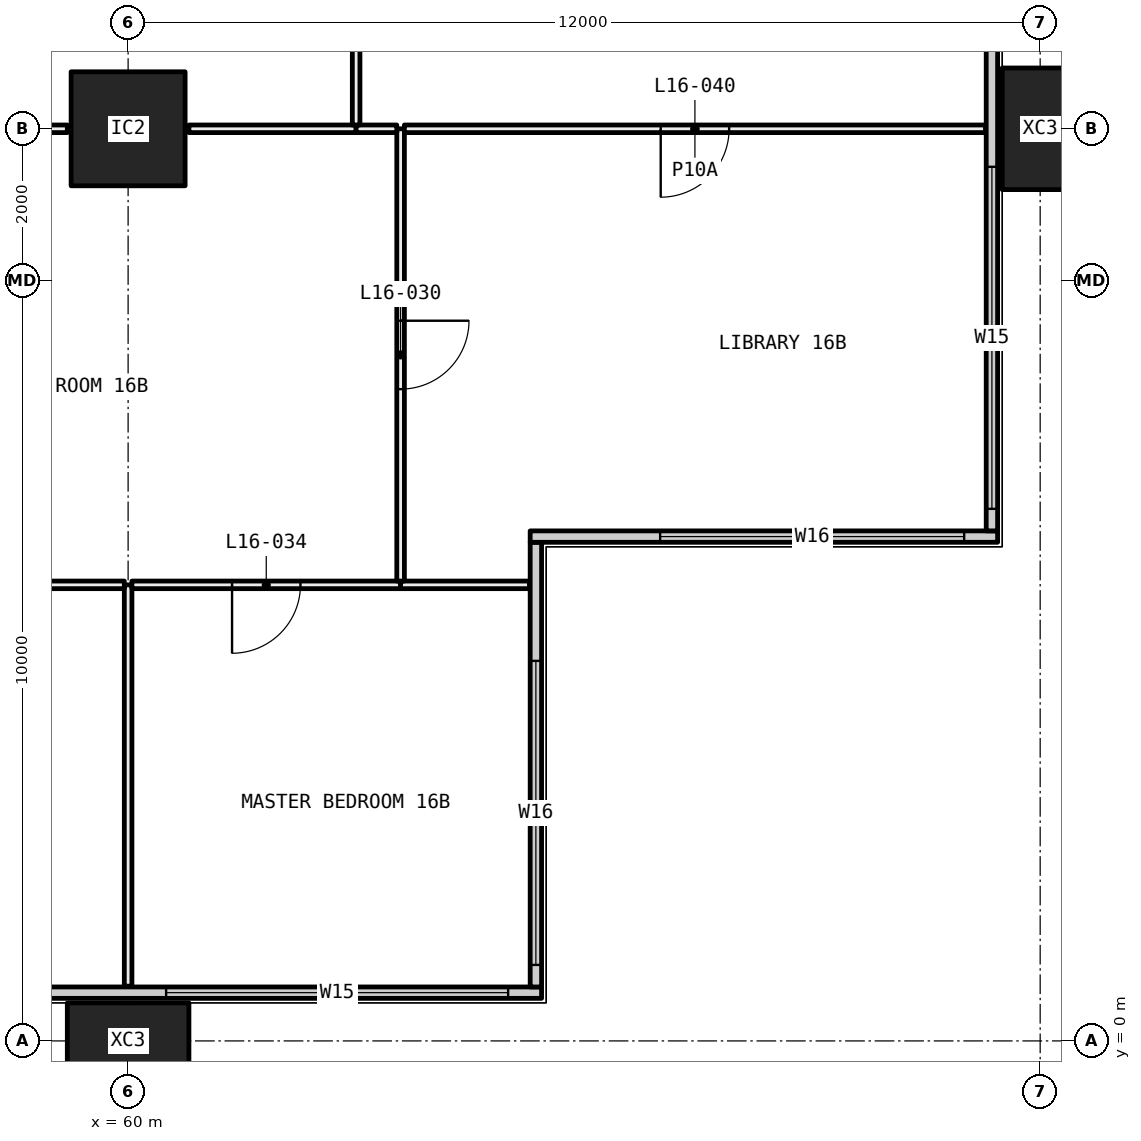
"""IFC4 building model, lengths in metres.
Left out: names, types, materials, properties, quantities, classifications, styles, units other than length and angle.
Written with IfcOpenShell. Run it as: python <this file> out.ifc"""

import sys

from ifc_helpers import new_model, si_unit, direction, frame, frame_2d, origin, origin_2d, place, context, subcontext, project, spatial, rectangle, hollow_rectangle, extrude, element, fill, save


model = new_model("IFC4")
c1 = context("Model", 3, precision=1e-05, world=origin(), true_north=direction((0.0, 1.0)))
c2 = subcontext(c1, "Body", "Model", "MODEL_VIEW")
j1 = project(units=[si_unit("LENGTHUNIT", "METRE"), si_unit("PLANEANGLEUNIT", "RADIAN")], contexts=[c1])
p1 = place(None, origin())
s1 = spatial("IfcSite", under=j1, at=p1, CompositionType="ELEMENT")
p2 = place(p1, origin())
s2 = spatial("IfcBuilding", under=s1, at=p2, CompositionType="ELEMENT")
p3 = place(p2, frame((0.0, 0.0, 67.95)))
s3 = spatial("IfcBuildingStorey", under=s2, at=p3, CompositionType="ELEMENT", Elevation=67.95)
p4 = place(p3, frame((60.0, 0.0, -0.4), z_axis=(0.0, 0.0, 1.0), x_axis=(1.0, 0.0, 0.0)))
e1 = element("IfcColumn", 1, at=p4, inside=s3, PredefinedType="COLUMN", context=c2, shape_type="SweptSolid", body=[
    extrude(hollow_rectangle(XDim=1.6, YDim=1.0, WallThickness=0.065, at=origin_2d()), origin(), (0.0, 0.0, 1.0), 3.45),
])
p5 = place(p3, frame((60.0, 12.0, 0.0), z_axis=(0.0, 0.0, 1.0), x_axis=(1.0, 0.0, 0.0)))
e2 = element("IfcColumn", 2, at=p5, inside=s3, PredefinedType="COLUMN", context=c2, shape_type="SweptSolid", body=[
    extrude(hollow_rectangle(XDim=1.5, YDim=1.5, WallThickness=0.065, at=origin_2d()), origin(), (0.0, 0.0, 1.0), 3.05),
])
p6 = place(p3, frame((72.0, 12.0, -0.4), z_axis=(0.0, 0.0, 1.0), x_axis=(0.0, 1.0, 0.0)))
e3 = element("IfcColumn", 3, at=p6, inside=s3, PredefinedType="COLUMN", context=c2, shape_type="SweptSolid", body=[
    extrude(hollow_rectangle(XDim=1.6, YDim=1.0, WallThickness=0.065, at=origin_2d()), origin(), (0.0, 0.0, 1.0), 3.45),
])
p7 = place(p3, frame((6.56, 0.635, 0.0), z_axis=(0.0, 0.0, 1.0), x_axis=(1.0, 0.0, 0.0)))
e4 = element("IfcWall", 4, at=p7, inside=s3, PredefinedType="ELEMENTEDWALL", context=c2, shape_type="SweptSolid", body=[
    extrude(rectangle(XDim=58.88, YDim=0.15, at=frame_2d((29.44, 0.0))), origin(), (0.0, 0.0, 1.0), 3.05),
])
p8 = place(p7, frame((0.44, 0.0, 0.45)))
e5 = element("IfcOpeningElement", 5, at=p8, cuts=e4, PredefinedType="OPENING", context=c2, shape_type="SweptSolid", body=[
    extrude(rectangle(XDim=4.5, YDim=2.55, at=frame_2d((2.25, 1.275))), frame((0.0, 0.085, 0.0), z_axis=(0.0, -1.0, 0.0), x_axis=(1.0, 0.0, 0.0)), (0.0, 0.0, 1.0), 0.17),
])
p9 = place(p7, frame((7.69, 0.0, 0.45)))
e6 = element("IfcOpeningElement", 6, at=p9, cuts=e4, PredefinedType="OPENING", context=c2, shape_type="SweptSolid", body=[
    extrude(rectangle(XDim=3.25, YDim=2.55, at=frame_2d((1.625, 1.275))), frame((0.0, 0.085, 0.0), z_axis=(0.0, -1.0, 0.0), x_axis=(1.0, 0.0, 0.0)), (0.0, 0.0, 1.0), 0.17),
])
p10 = place(p7, frame((11.94, 0.0, 0.45)))
e7 = element("IfcOpeningElement", 7, at=p10, cuts=e4, PredefinedType="OPENING", context=c2, shape_type="SweptSolid", body=[
    extrude(rectangle(XDim=3.25, YDim=2.55, at=frame_2d((1.625, 1.275))), frame((0.0, 0.085, 0.0), z_axis=(0.0, -1.0, 0.0), x_axis=(1.0, 0.0, 0.0)), (0.0, 0.0, 1.0), 0.17),
])
p11 = place(p7, frame((19.69, 0.0, 0.45)))
e8 = element("IfcOpeningElement", 8, at=p11, cuts=e4, PredefinedType="OPENING", context=c2, shape_type="SweptSolid", body=[
    extrude(rectangle(XDim=3.25, YDim=2.55, at=frame_2d((1.625, 1.275))), frame((0.0, 0.085, 0.0), z_axis=(0.0, -1.0, 0.0), x_axis=(1.0, 0.0, 0.0)), (0.0, 0.0, 1.0), 0.17),
])
p12 = place(p7, frame((23.94, 0.0, 0.45)))
e9 = element("IfcOpeningElement", 9, at=p12, cuts=e4, PredefinedType="OPENING", context=c2, shape_type="SweptSolid", body=[
    extrude(rectangle(XDim=2.0, YDim=2.55, at=frame_2d((1.0, 1.275))), frame((0.0, 0.085, 0.0), z_axis=(0.0, -1.0, 0.0), x_axis=(1.0, 0.0, 0.0)), (0.0, 0.0, 1.0), 0.17),
])
p13 = place(p7, frame((31.69, 0.0, 0.45)))
e10 = element("IfcOpeningElement", 10, at=p13, cuts=e4, PredefinedType="OPENING", context=c2, shape_type="SweptSolid", body=[
    extrude(rectangle(XDim=3.25, YDim=2.55, at=frame_2d((1.625, 1.275))), frame((0.0, 0.085, 0.0), z_axis=(0.0, -1.0, 0.0), x_axis=(1.0, 0.0, 0.0)), (0.0, 0.0, 1.0), 0.17),
])
p14 = place(p7, frame((35.94, 0.0, 0.45)))
e11 = element("IfcOpeningElement", 11, at=p14, cuts=e4, PredefinedType="OPENING", context=c2, shape_type="SweptSolid", body=[
    extrude(rectangle(XDim=3.25, YDim=2.55, at=frame_2d((1.625, 1.275))), frame((0.0, 0.085, 0.0), z_axis=(0.0, -1.0, 0.0), x_axis=(1.0, 0.0, 0.0)), (0.0, 0.0, 1.0), 0.17),
])
p15 = place(p7, frame((43.69, 0.0, 0.45)))
e12 = element("IfcOpeningElement", 12, at=p15, cuts=e4, PredefinedType="OPENING", context=c2, shape_type="SweptSolid", body=[
    extrude(rectangle(XDim=3.25, YDim=2.55, at=frame_2d((1.625, 1.275))), frame((0.0, 0.085, 0.0), z_axis=(0.0, -1.0, 0.0), x_axis=(1.0, 0.0, 0.0)), (0.0, 0.0, 1.0), 0.17),
])
p16 = place(p7, frame((47.94, 0.0, 0.45)))
e13 = element("IfcOpeningElement", 13, at=p16, cuts=e4, PredefinedType="OPENING", context=c2, shape_type="SweptSolid", body=[
    extrude(rectangle(XDim=2.0, YDim=2.55, at=frame_2d((1.0, 1.275))), frame((0.0, 0.085, 0.0), z_axis=(0.0, -1.0, 0.0), x_axis=(1.0, 0.0, 0.0)), (0.0, 0.0, 1.0), 0.17),
])
p17 = place(p7, frame((53.94, 0.0, 0.45)))
e14 = element("IfcOpeningElement", 14, at=p17, cuts=e4, PredefinedType="OPENING", context=c2, shape_type="SweptSolid", body=[
    extrude(rectangle(XDim=4.5, YDim=2.55, at=frame_2d((2.25, 1.275))), frame((0.0, 0.085, 0.0), z_axis=(0.0, -1.0, 0.0), x_axis=(1.0, 0.0, 0.0)), (0.0, 0.0, 1.0), 0.17),
])
p18 = place(p3, frame((65.365, 0.71, 0.0), z_axis=(0.0, 0.0, 1.0), x_axis=(0.0, 1.0, 0.0)))
e15 = element("IfcWall", 15, at=p18, inside=s3, PredefinedType="ELEMENTEDWALL", context=c2, shape_type="SweptSolid", body=[
    extrude(rectangle(XDim=5.85, YDim=0.15, at=frame_2d((2.925, 0.0))), origin(), (0.0, 0.0, 1.0), 3.05),
])
p19 = place(p18, frame((0.29, 0.0, 0.45)))
e16 = element("IfcOpeningElement", 16, at=p19, cuts=e15, PredefinedType="OPENING", context=c2, shape_type="SweptSolid", body=[
    extrude(rectangle(XDim=4.0, YDim=2.55, at=frame_2d((2.0, 1.275))), frame((0.0, 0.085, 0.0), z_axis=(0.0, -1.0, 0.0), x_axis=(1.0, 0.0, 0.0)), (0.0, 0.0, 1.0), 0.17),
])
p20 = place(p3, frame((65.29, 6.635, 0.0), z_axis=(0.0, 0.0, 1.0), x_axis=(1.0, 0.0, 0.0)))
e17 = element("IfcWall", 17, at=p20, inside=s3, PredefinedType="ELEMENTEDWALL", context=c2, shape_type="SweptSolid", body=[
    extrude(rectangle(XDim=6.15, YDim=0.15, at=frame_2d((3.075, 0.0))), origin(), (0.0, 0.0, 1.0), 3.05),
])
p21 = place(p20, frame((1.71, 0.0, 0.45)))
e18 = element("IfcOpeningElement", 18, at=p21, cuts=e17, PredefinedType="OPENING", context=c2, shape_type="SweptSolid", body=[
    extrude(rectangle(XDim=4.0, YDim=2.55, at=frame_2d((2.0, 1.275))), frame((0.0, 0.085, 0.0), z_axis=(0.0, -1.0, 0.0), x_axis=(1.0, 0.0, 0.0)), (0.0, 0.0, 1.0), 0.17),
])
p22 = place(p3, frame((71.365, 6.71, 0.0), z_axis=(0.0, 0.0, 1.0), x_axis=(0.0, 1.0, 0.0)))
e19 = element("IfcWall", 19, at=p22, inside=s3, PredefinedType="ELEMENTEDWALL", context=c2, shape_type="SweptSolid", body=[
    extrude(rectangle(XDim=34.58, YDim=0.15, at=frame_2d((17.29, 0.0))), origin(), (0.0, 0.0, 1.0), 3.05),
])
p23 = place(p22, frame((0.29, 0.0, 0.45)))
e20 = element("IfcOpeningElement", 20, at=p23, cuts=e19, PredefinedType="OPENING", context=c2, shape_type="SweptSolid", body=[
    extrude(rectangle(XDim=4.5, YDim=2.55, at=frame_2d((2.25, 1.275))), frame((0.0, 0.085, 0.0), z_axis=(0.0, -1.0, 0.0), x_axis=(1.0, 0.0, 0.0)), (0.0, 0.0, 1.0), 0.17),
])
p24 = place(p22, frame((7.54, 0.0, 0.45)))
e21 = element("IfcOpeningElement", 21, at=p24, cuts=e19, PredefinedType="OPENING", context=c2, shape_type="SweptSolid", body=[
    extrude(rectangle(XDim=3.25, YDim=2.55, at=frame_2d((1.625, 1.275))), frame((0.0, 0.085, 0.0), z_axis=(0.0, -1.0, 0.0), x_axis=(1.0, 0.0, 0.0)), (0.0, 0.0, 1.0), 0.17),
])
p25 = place(p22, frame((11.79, 0.0, 0.45)))
e22 = element("IfcOpeningElement", 22, at=p25, cuts=e19, PredefinedType="OPENING", context=c2, shape_type="SweptSolid", body=[
    extrude(rectangle(XDim=3.25, YDim=2.55, at=frame_2d((1.625, 1.275))), frame((0.0, 0.085, 0.0), z_axis=(0.0, -1.0, 0.0), x_axis=(1.0, 0.0, 0.0)), (0.0, 0.0, 1.0), 0.17),
])
p26 = place(p22, frame((19.54, 0.0, 0.45)))
e23 = element("IfcOpeningElement", 23, at=p26, cuts=e19, PredefinedType="OPENING", context=c2, shape_type="SweptSolid", body=[
    extrude(rectangle(XDim=3.25, YDim=2.55, at=frame_2d((1.625, 1.275))), frame((0.0, 0.085, 0.0), z_axis=(0.0, -1.0, 0.0), x_axis=(1.0, 0.0, 0.0)), (0.0, 0.0, 1.0), 0.17),
])
p27 = place(p22, frame((23.79, 0.0, 0.45)))
e24 = element("IfcOpeningElement", 24, at=p27, cuts=e19, PredefinedType="OPENING", context=c2, shape_type="SweptSolid", body=[
    extrude(rectangle(XDim=2.0, YDim=2.55, at=frame_2d((1.0, 1.275))), frame((0.0, 0.085, 0.0), z_axis=(0.0, -1.0, 0.0), x_axis=(1.0, 0.0, 0.0)), (0.0, 0.0, 1.0), 0.17),
])
p28 = place(p22, frame((29.79, 0.0, 0.45)))
e25 = element("IfcOpeningElement", 25, at=p28, cuts=e19, PredefinedType="OPENING", context=c2, shape_type="SweptSolid", body=[
    extrude(rectangle(XDim=4.5, YDim=2.55, at=frame_2d((2.25, 1.275))), frame((0.0, 0.085, 0.0), z_axis=(0.0, -1.0, 0.0), x_axis=(1.0, 0.0, 0.0)), (0.0, 0.0, 1.0), 0.17),
])
p29 = place(p3, frame((60.0, 0.72, 0.0), z_axis=(0.0, 0.0, 1.0), x_axis=(0.0, 1.0, 0.0)))
e26 = element("IfcWall", 26, at=p29, inside=s3, PredefinedType="PARTITIONING", context=c2, shape_type="SweptSolid", body=[
    extrude(rectangle(XDim=5.28, YDim=0.1, at=frame_2d((2.64, 0.0))), origin(), (0.0, 0.0, 1.0), 2.45),
])
p30 = place(p3, frame((59.95, 6.0, 0.0), z_axis=(0.0, 0.0, 1.0), x_axis=(-1.0, 0.0, 0.0)))
e27 = element("IfcWall", 27, at=p30, inside=s3, PredefinedType="PARTITIONING", context=c2, shape_type="SweptSolid", body=[
    extrude(rectangle(XDim=4.06, YDim=0.1, at=frame_2d((2.03, 0.0))), origin(), (0.0, 0.0, 1.0), 2.45),
])
p31 = place(p3, frame((63.585, 6.0, 0.0), z_axis=(0.0, 0.0, 1.0), x_axis=(-1.0, 0.0, 0.0)))
e28 = element("IfcWall", 28, at=p31, inside=s3, PredefinedType="PARTITIONING", context=c2, shape_type="SweptSolid", body=[
    extrude(rectangle(XDim=3.535, YDim=0.1, at=frame_2d((1.768, 0.0))), origin(), (0.0, 0.0, 1.0), 2.45),
])
p32 = place(p31, frame((1.317, 0.0, 0.0)))
e29 = element("IfcOpeningElement", 29, at=p32, cuts=e28, PredefinedType="OPENING", context=c2, shape_type="SweptSolid", body=[
    extrude(rectangle(XDim=0.9, YDim=2.1, at=frame_2d((0.45, 1.05))), frame((0.0, 0.06, 0.0), z_axis=(0.0, -1.0, 0.0), x_axis=(1.0, 0.0, 0.0)), (0.0, 0.0, 1.0), 0.12),
])
p33 = place(p3, frame((65.28, 6.0, 0.0), z_axis=(0.0, 0.0, 1.0), x_axis=(-1.0, 0.0, 0.0)))
e30 = element("IfcWall", 30, at=p33, inside=s3, PredefinedType="PARTITIONING", context=c2, shape_type="SweptSolid", body=[
    extrude(rectangle(XDim=1.695, YDim=0.1, at=frame_2d((0.848, 0.0))), origin(), (0.0, 0.0, 1.0), 3.05),
])
p34 = place(p3, frame((63.585, 6.05, 0.0), z_axis=(0.0, 0.0, 1.0), x_axis=(0.0, 1.0, 0.0)))
e31 = element("IfcWall", 31, at=p34, inside=s3, PredefinedType="PARTITIONING", context=c2, shape_type="SweptSolid", body=[
    extrude(rectangle(XDim=5.95, YDim=0.1, at=frame_2d((2.975, 0.0))), origin(), (0.0, 0.0, 1.0), 2.45),
])
p35 = place(p34, frame((2.525, 0.0, 0.0)))
e32 = element("IfcOpeningElement", 32, at=p35, cuts=e31, PredefinedType="OPENING", context=c2, shape_type="SweptSolid", body=[
    extrude(rectangle(XDim=0.9, YDim=2.1, at=frame_2d((0.45, 1.05))), frame((0.0, 0.06, 0.0), z_axis=(0.0, -1.0, 0.0), x_axis=(1.0, 0.0, 0.0)), (0.0, 0.0, 1.0), 0.12),
])
p36 = place(p3, frame((59.2, 12.0, 0.0), z_axis=(0.0, 0.0, 1.0), x_axis=(-1.0, 0.0, 0.0)))
e33 = element("IfcWall", 33, at=p36, inside=s3, PredefinedType="PARTITIONING", context=c2, shape_type="SweptSolid", body=[
    extrude(rectangle(XDim=3.26, YDim=0.1, at=frame_2d((1.63, 0.0))), origin(), (0.0, 0.0, 1.0), 2.45),
])
p37 = place(p3, frame((63.0, 12.0, 0.0), z_axis=(0.0, 0.0, 1.0), x_axis=(-1.0, 0.0, 0.0)))
e34 = element("IfcWall", 34, at=p37, inside=s3, PredefinedType="PARTITIONING", context=c2, shape_type="SweptSolid", body=[
    extrude(rectangle(XDim=2.2, YDim=0.1, at=frame_2d((1.1, 0.0))), origin(), (0.0, 0.0, 1.0), 2.45),
])
p38 = place(p3, frame((63.535, 12.0, 0.0), z_axis=(0.0, 0.0, 1.0), x_axis=(-1.0, 0.0, 0.0)))
e35 = element("IfcWall", 35, at=p38, inside=s3, PredefinedType="PARTITIONING", context=c2, shape_type="SweptSolid", body=[
    extrude(rectangle(XDim=0.535, YDim=0.1, at=frame_2d((0.268, 0.0))), origin(), (0.0, 0.0, 1.0), 2.45),
])
p39 = place(p3, frame((71.28, 12.0, 0.0), z_axis=(0.0, 0.0, 1.0), x_axis=(-1.0, 0.0, 0.0)))
e36 = element("IfcWall", 36, at=p39, inside=s3, PredefinedType="PARTITIONING", context=c2, shape_type="SweptSolid", body=[
    extrude(rectangle(XDim=7.645, YDim=0.1, at=frame_2d((3.823, 0.0))), origin(), (0.0, 0.0, 1.0), 2.45),
])
p40 = place(p39, frame((3.373, 0.0, 0.0)))
e37 = element("IfcOpeningElement", 37, at=p40, cuts=e36, PredefinedType="OPENING", context=c2, shape_type="SweptSolid", body=[
    extrude(rectangle(XDim=0.9, YDim=2.1, at=frame_2d((0.45, 1.05))), frame((0.0, 0.06, 0.0), z_axis=(0.0, -1.0, 0.0), x_axis=(1.0, 0.0, 0.0)), (0.0, 0.0, 1.0), 0.12),
])
p41 = place(p3, frame((63.0, 12.05, 0.0), z_axis=(0.0, 0.0, 1.0), x_axis=(0.0, 1.0, 0.0)))
e38 = element("IfcWall", 38, at=p41, inside=s3, PredefinedType="PARTITIONING", context=c2, shape_type="SweptSolid", body=[
    extrude(rectangle(XDim=5.85, YDim=0.1, at=frame_2d((2.925, 0.0))), origin(), (0.0, 0.0, 1.0), 2.45),
])
p42 = place(p17, origin())
e39 = element("IfcWindow", 39, at=p42, inside=s3, PartitioningType="SINGLE_PANEL", PredefinedType="WINDOW", context=c2, shape_type="SweptSolid", body=[
    extrude(rectangle(XDim=4.5, YDim=2.55, at=frame_2d((2.25, 1.275))), frame((0.0, 0.03, 0.0), z_axis=(0.0, -1.0, 0.0), x_axis=(1.0, 0.0, 0.0)), (0.0, 0.0, 1.0), 0.06),
])
fill(e14, e39)
p43 = place(p19, origin())
e40 = element("IfcWindow", 40, at=p43, inside=s3, PartitioningType="SINGLE_PANEL", PredefinedType="WINDOW", context=c2, shape_type="SweptSolid", body=[
    extrude(rectangle(XDim=4.0, YDim=2.55, at=frame_2d((2.0, 1.275))), frame((0.0, 0.03, 0.0), z_axis=(0.0, -1.0, 0.0), x_axis=(1.0, 0.0, 0.0)), (0.0, 0.0, 1.0), 0.06),
])
fill(e16, e40)
p44 = place(p21, origin())
e41 = element("IfcWindow", 41, at=p44, inside=s3, PartitioningType="SINGLE_PANEL", PredefinedType="WINDOW", context=c2, shape_type="SweptSolid", body=[
    extrude(rectangle(XDim=4.0, YDim=2.55, at=frame_2d((2.0, 1.275))), frame((0.0, 0.03, 0.0), z_axis=(0.0, -1.0, 0.0), x_axis=(1.0, 0.0, 0.0)), (0.0, 0.0, 1.0), 0.06),
])
fill(e18, e41)
p45 = place(p23, origin())
e42 = element("IfcWindow", 42, at=p45, inside=s3, PartitioningType="SINGLE_PANEL", PredefinedType="WINDOW", context=c2, shape_type="SweptSolid", body=[
    extrude(rectangle(XDim=4.5, YDim=2.55, at=frame_2d((2.25, 1.275))), frame((0.0, 0.03, 0.0), z_axis=(0.0, -1.0, 0.0), x_axis=(1.0, 0.0, 0.0)), (0.0, 0.0, 1.0), 0.06),
])
fill(e20, e42)
p46 = place(p35, frame((0.9, 0.0, 0.0), x_axis=(-1.0, 0.0, 0.0)))
e43 = element("IfcDoor", 43, at=p46, inside=s3, OperationType="SINGLE_SWING_RIGHT", PredefinedType="DOOR", context=c2, shape_type="SweptSolid", body=[
    extrude(rectangle(XDim=0.9, YDim=2.1, at=frame_2d((0.45, 1.05))), frame((0.0, 0.025, 0.0), z_axis=(0.0, -1.0, 0.0), x_axis=(1.0, 0.0, 0.0)), (0.0, 0.0, 1.0), 0.05),
])
fill(e32, e43)
p47 = place(p32, origin())
e44 = element("IfcDoor", 44, at=p47, inside=s3, OperationType="SINGLE_SWING_LEFT", PredefinedType="DOOR", context=c2, shape_type="SweptSolid", body=[
    extrude(rectangle(XDim=0.9, YDim=2.1, at=frame_2d((0.45, 1.05))), frame((0.0, 0.025, 0.0), z_axis=(0.0, -1.0, 0.0), x_axis=(1.0, 0.0, 0.0)), (0.0, 0.0, 1.0), 0.05),
])
fill(e29, e44)
p48 = place(p40, origin())
e45 = element("IfcDoor", 45, at=p48, inside=s3, OperationType="SINGLE_SWING_LEFT", PredefinedType="DOOR", context=c2, shape_type="SweptSolid", body=[
    extrude(rectangle(XDim=0.9, YDim=2.1, at=frame_2d((0.45, 1.05))), frame((0.0, 0.025, 0.0), z_axis=(0.0, -1.0, 0.0), x_axis=(1.0, 0.0, 0.0)), (0.0, 0.0, 1.0), 0.05),
])
fill(e37, e45)
save(model, sys.argv[1])
